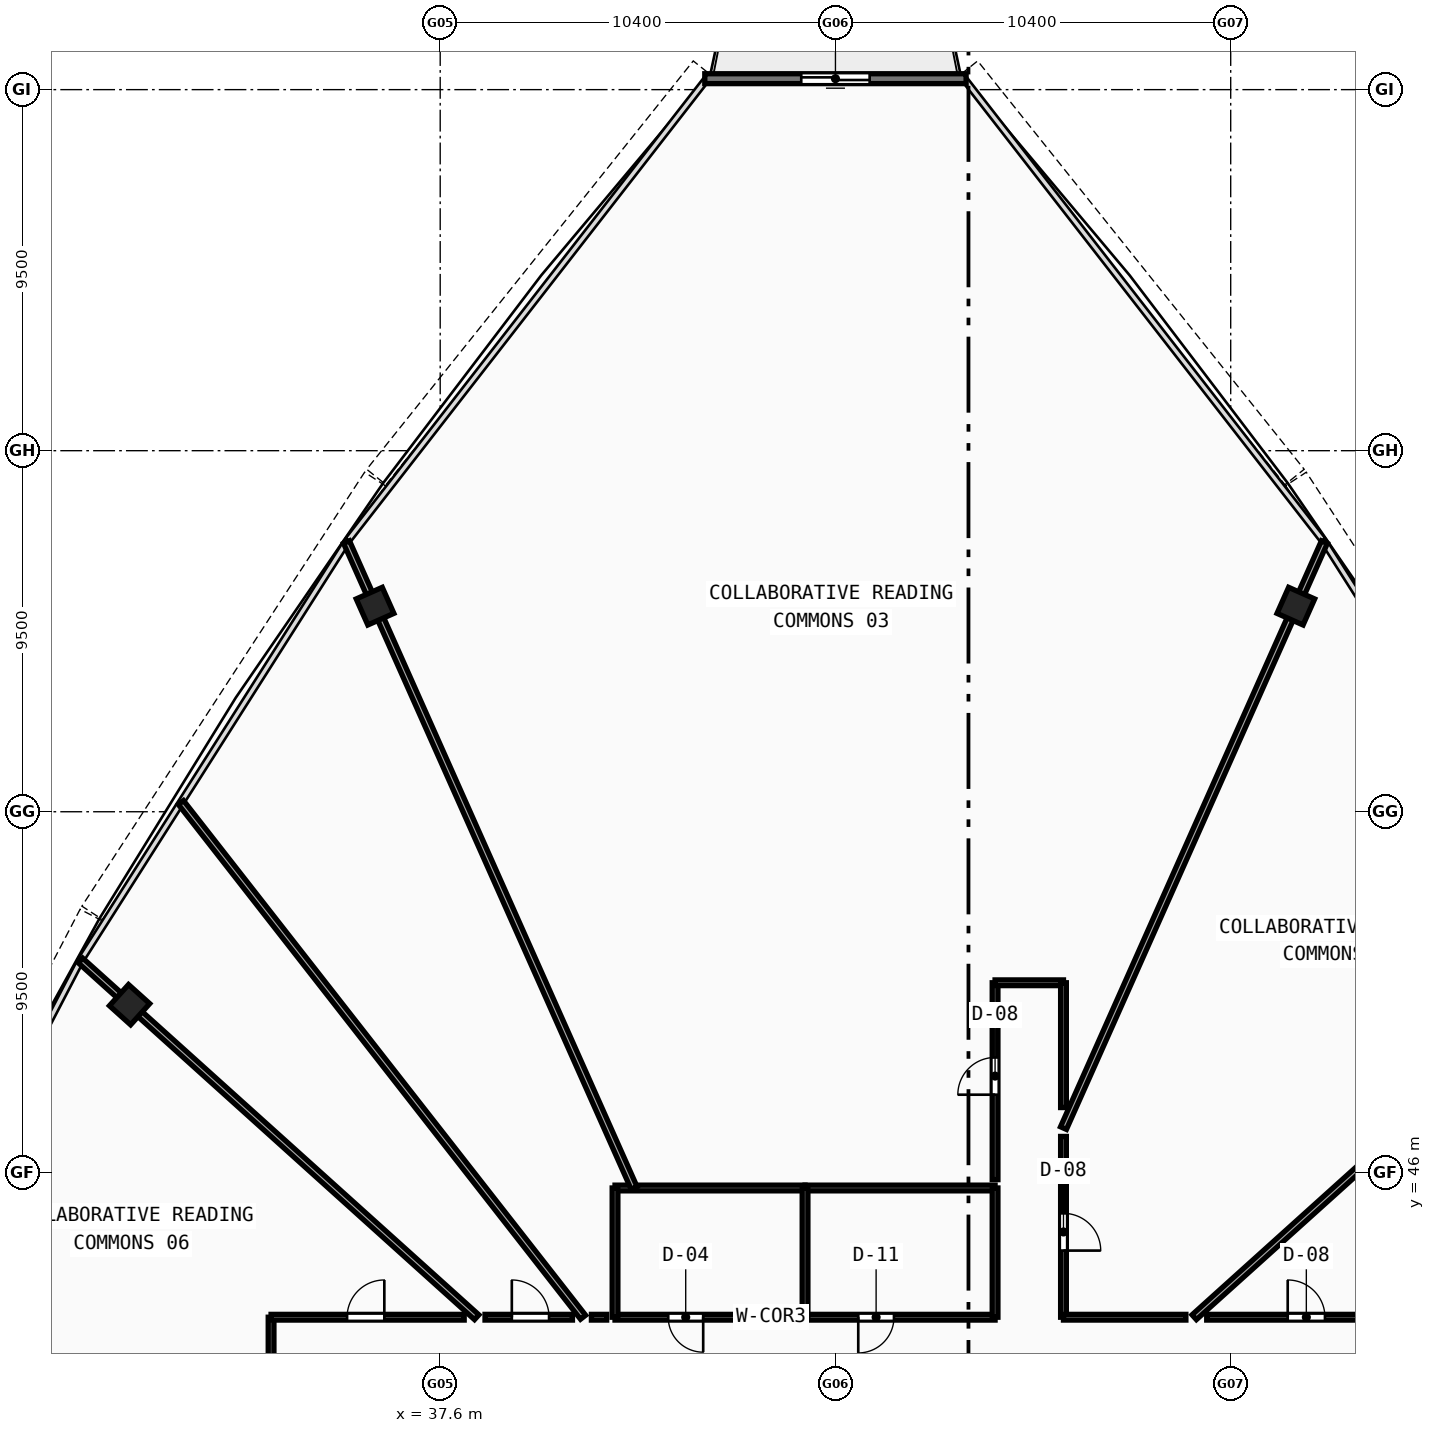
"""IFC4 building model, lengths in metres.
Left out: names, types, materials, properties, quantities, classifications, styles, units other than length and angle.
Written with IfcOpenShell. Run it as: python <this file> out.ifc"""

import sys

from ifc_helpers import new_model, si_unit, direction, frame, frame_2d, origin, origin_with_axes, origin_2d, place, context, subcontext, project, spatial, rectangle, hollow_rectangle, extrude, source, transform, mapped, element, fill, save


model = new_model("IFC4")
c1 = context("Model", 3, precision=1e-05, world=origin(), true_north=direction((0.0, 1.0)))
c2 = subcontext(c1, "Body", "Model", "MODEL_VIEW")
j1 = project(units=[si_unit("LENGTHUNIT", "METRE"), si_unit("PLANEANGLEUNIT", "RADIAN")], contexts=[c1])
p1 = place(None, origin())
s1 = spatial("IfcSite", under=j1, at=p1, CompositionType="ELEMENT")
p2 = place(p1, origin())
s2 = spatial("IfcBuilding", under=s1, at=p2, CompositionType="ELEMENT")
p3 = place(p2, frame((0.0, 0.0, 299.94)))
s3 = spatial("IfcBuildingStorey", under=s2, at=p3, CompositionType="ELEMENT", Elevation=299.94)
m1 = source(origin(), c2, "Body", "SweptSolid", [
    extrude(hollow_rectangle(XDim=0.75, YDim=0.75, WallThickness=0.028, at=origin_2d()), origin(), (0.0, 0.0, 1.0), 3.73),
])
for number, where, z_axis, x_axis in (
    (1, (60.114, 60.909, -0.26), (0.0, 0.0, 1.0), (-0.914, 0.407, 0.0)),
    (2, (35.886, 60.909, -0.26), (0.0, 0.0, 1.0), (-0.914, -0.407, 0.0)),
    (3, (29.427, 50.424, -0.26), (0.0, 0.0, 1.0), (-0.669, -0.743, 0.0)),
):
    element("IfcColumn", number, at=place(p3, frame(where, z_axis=z_axis, x_axis=x_axis)), inside=s3, PredefinedType="COLUMN", context=c2, shape_type="MappedRepresentation", body=[
        mapped(m1, transform((0.0, 0.0, 0.0), scale=1.0)),
    ])
p4 = place(p3, frame((51.438, 74.788, 0.0), z_axis=(0.0, 0.0, 1.0), x_axis=(-1.0, 0.0, 0.0)))
e4 = element("IfcWall", 4, at=p4, inside=s3, PredefinedType="STANDARD", context=c2, shape_type="SweptSolid", body=[
    extrude(rectangle(XDim=6.875, YDim=0.26, at=frame_2d((3.438, 0.0))), origin(), (0.0, 0.0, 1.0), 3.47),
])
p5 = place(p4, frame((2.538, 0.0, 0.0)))
e5 = element("IfcOpeningElement", 5, at=p5, cuts=e4, PredefinedType="OPENING", context=c2, shape_type="SweptSolid", body=[
    extrude(rectangle(XDim=1.8, YDim=2.15, at=frame_2d((0.9, 1.075))), frame((0.0, 0.14, 0.0), z_axis=(0.0, -1.0, 0.0), x_axis=(1.0, 0.0, 0.0)), (0.0, 0.0, 1.0), 0.28),
])
p6 = place(p3, frame((42.2, 42.2, 0.0), z_axis=(0.0, 0.0, 1.0), x_axis=(1.0, 0.0, 0.0)))
e6 = element("IfcWall", 6, at=p6, inside=s3, PredefinedType="PARTITIONING", context=c2, shape_type="SweptSolid", body=[
    extrude(rectangle(XDim=5.0, YDim=0.15, at=frame_2d((2.5, 0.0))), origin(), (0.0, 0.0, 1.0), 2.87),
])
p7 = place(p6, frame((1.4, 0.0, 0.0)))
e7 = element("IfcOpeningElement", 7, at=p7, cuts=e6, PredefinedType="OPENING", context=c2, shape_type="SweptSolid", body=[
    extrude(rectangle(XDim=0.92, YDim=2.1, at=frame_2d((0.46, 1.05))), frame((0.0, 0.085, 0.0), z_axis=(0.0, -1.0, 0.0), x_axis=(1.0, 0.0, 0.0)), (0.0, 0.0, 1.0), 0.17),
])
p8 = place(p3, frame((42.2, 45.6, 0.0), z_axis=(0.0, 0.0, 1.0), x_axis=(1.0, 0.0, 0.0)))
e8 = element("IfcWall", 8, at=p8, inside=s3, PredefinedType="PARTITIONING", context=c2, shape_type="SweptSolid", body=[
    extrude(rectangle(XDim=5.0, YDim=0.15, at=frame_2d((2.5, 0.0))), origin(), (0.0, 0.0, 1.0), 2.87),
])
p9 = place(p3, frame((42.2, 42.2, 0.0), z_axis=(0.0, 0.0, 1.0), x_axis=(0.0, 1.0, 0.0)))
e9 = element("IfcWall", 9, at=p9, inside=s3, PredefinedType="PARTITIONING", context=c2, shape_type="SweptSolid", body=[
    extrude(rectangle(XDim=3.4, YDim=0.15, at=frame_2d((1.7, 0.0))), origin(), (0.0, 0.0, 1.0), 3.47),
])
p10 = place(p3, frame((47.2, 42.2, 0.0), z_axis=(0.0, 0.0, 1.0), x_axis=(1.0, 0.0, 0.0)))
e10 = element("IfcWall", 10, at=p10, inside=s3, PredefinedType="PARTITIONING", context=c2, shape_type="SweptSolid", body=[
    extrude(rectangle(XDim=5.0, YDim=0.15, at=frame_2d((2.5, 0.0))), origin(), (0.0, 0.0, 1.0), 2.87),
])
p11 = place(p10, frame((1.4, 0.0, 0.0)))
e11 = element("IfcOpeningElement", 11, at=p11, cuts=e10, PredefinedType="OPENING", context=c2, shape_type="SweptSolid", body=[
    extrude(rectangle(XDim=0.94, YDim=2.1, at=frame_2d((0.47, 1.05))), frame((0.0, 0.085, 0.0), z_axis=(0.0, -1.0, 0.0), x_axis=(1.0, 0.0, 0.0)), (0.0, 0.0, 1.0), 0.17),
])
p12 = place(p3, frame((47.2, 45.6, 0.0), z_axis=(0.0, 0.0, 1.0), x_axis=(1.0, 0.0, 0.0)))
e12 = element("IfcWall", 12, at=p12, inside=s3, PredefinedType="PARTITIONING", context=c2, shape_type="SweptSolid", body=[
    extrude(rectangle(XDim=5.0, YDim=0.15, at=frame_2d((2.5, 0.0))), origin(), (0.0, 0.0, 1.0), 3.47),
])
p13 = place(p3, frame((47.2, 42.2, 0.0), z_axis=(0.0, 0.0, 1.0), x_axis=(0.0, 1.0, 0.0)))
e13 = element("IfcWall", 13, at=p13, inside=s3, PredefinedType="PARTITIONING", context=c2, shape_type="SweptSolid", body=[
    extrude(rectangle(XDim=3.4, YDim=0.15, at=frame_2d((1.7, 0.0))), origin(), (0.0, 0.0, 1.0), 3.47),
])
p14 = place(p3, frame((52.2, 42.2, 0.0), z_axis=(0.0, 0.0, 1.0), x_axis=(0.0, 1.0, 0.0)))
e14 = element("IfcWall", 14, at=p14, inside=s3, PredefinedType="PARTITIONING", context=c2, shape_type="SweptSolid", body=[
    extrude(rectangle(XDim=3.4, YDim=0.15, at=frame_2d((1.7, 0.0))), origin(), (0.0, 0.0, 1.0), 2.87),
])
p15 = place(p3, frame((57.44, 42.2, 0.0), z_axis=(0.0, 0.0, 1.0), x_axis=(0.74314439151, 0.669131088329, 0.0)))
e15 = element("IfcWall", 15, at=p15, inside=s3, PredefinedType="PARTITIONING", context=c2, shape_type="SweptSolid", body=[
    extrude(rectangle(XDim=14.026, YDim=0.17, at=frame_2d((7.013, 0.0))), origin(), (0.0, 0.0, 1.0), 2.87),
])
p16 = place(p3, frame((54.0, 47.176, 0.0), z_axis=(0.0, 0.0, 1.0), x_axis=(0.406741029061, 0.913543504863, 0.0)))
e16 = element("IfcWall", 16, at=p16, inside=s3, PredefinedType="PARTITIONING", context=c2, shape_type="SweptSolid", body=[
    extrude(rectangle(XDim=16.877, YDim=0.17, at=frame_2d((8.438, 0.0))), origin(), (0.0, 0.0, 1.0), 2.87),
])
p17 = place(p3, frame((42.702, 45.6, 0.0), z_axis=(0.0, 0.0, 1.0), x_axis=(-0.406747233578, 0.913540742374, 0.0)))
e17 = element("IfcWall", 17, at=p17, inside=s3, PredefinedType="PARTITIONING", context=c2, shape_type="SweptSolid", body=[
    extrude(rectangle(XDim=18.602, YDim=0.17, at=frame_2d((9.301, 0.0))), origin(), (0.0, 0.0, 1.0), 2.87),
])
p18 = place(p3, frame((41.359, 42.2, 0.0), z_axis=(0.0, 0.0, 1.0), x_axis=(-0.615656448173, 0.788014681223, 0.0)))
e18 = element("IfcWall", 18, at=p18, inside=s3, PredefinedType="PARTITIONING", context=c2, shape_type="SweptSolid", body=[
    extrude(rectangle(XDim=17.185, YDim=0.17, at=frame_2d((8.592, 0.0))), origin(), (0.0, 0.0, 1.0), 2.87),
])
p19 = place(p3, frame((38.56, 42.2, 0.0), z_axis=(0.0, 0.0, 1.0), x_axis=(-0.74314439151, 0.669131088329, 0.0)))
e19 = element("IfcWall", 19, at=p19, inside=s3, PredefinedType="PARTITIONING", context=c2, shape_type="SweptSolid", body=[
    extrude(rectangle(XDim=14.026, YDim=0.17, at=frame_2d((7.013, 0.0))), origin(), (0.0, 0.0, 1.0), 2.87),
])
p20 = place(p3, frame((33.15, 38.525, 0.0), z_axis=(0.0, 0.0, 1.0), x_axis=(-0.951060589798, 0.309004457141, 0.0)))
e20 = element("IfcWall", 20, at=p20, inside=s3, PredefinedType="PARTITIONING", context=c2, shape_type="SweptSolid", body=[
    extrude(rectangle(XDim=10.62, YDim=0.17, at=frame_2d((5.31, 0.0))), origin(), (0.0, 0.0, 1.0), 2.87),
])
p21 = place(p3, frame((33.15, 38.756, 0.0), z_axis=(0.0, 0.0, 1.0), x_axis=(0.0, 1.0, 0.0)))
e21 = element("IfcWall", 21, at=p21, inside=s3, PredefinedType="PARTITIONING", context=c2, shape_type="SweptSolid", body=[
    extrude(rectangle(XDim=3.444, YDim=0.15, at=frame_2d((1.722, 0.0))), origin(), (0.0, 0.0, 1.0), 3.12),
])
p22 = place(p3, frame((33.15, 42.2, 0.0), z_axis=(0.0, 0.0, 1.0), x_axis=(1.0, 0.0, 0.0)))
e22 = element("IfcWall", 22, at=p22, inside=s3, PredefinedType="PARTITIONING", context=c2, shape_type="SweptSolid", body=[
    extrude(rectangle(XDim=5.081, YDim=0.15, at=frame_2d((2.541, 0.0))), origin(), (0.0, 0.0, 1.0), 3.12),
])
p23 = place(p22, frame((2.0, 0.0, 0.0)))
e23 = element("IfcOpeningElement", 23, at=p23, cuts=e22, PredefinedType="OPENING", context=c2, shape_type="SweptSolid", body=[
    extrude(rectangle(XDim=0.98, YDim=2.12, at=frame_2d((0.49, 1.06))), frame((0.0, 0.085, 0.0), z_axis=(0.0, -1.0, 0.0), x_axis=(1.0, 0.0, 0.0)), (0.0, 0.0, 1.0), 0.17),
])
p24 = place(p3, frame((38.78, 42.2, 0.0), z_axis=(0.0, 0.0, 1.0), x_axis=(1.0, 0.0, 0.0)))
e24 = element("IfcWall", 24, at=p24, inside=s3, PredefinedType="PARTITIONING", context=c2, shape_type="SweptSolid", body=[
    extrude(rectangle(XDim=2.3, YDim=0.15, at=frame_2d((1.15, 0.0))), origin(), (0.0, 0.0, 1.0), 2.87),
])
p25 = place(p24, frame((0.705, 0.0, 0.0)))
e25 = element("IfcOpeningElement", 25, at=p25, cuts=e24, PredefinedType="OPENING", context=c2, shape_type="SweptSolid", body=[
    extrude(rectangle(XDim=0.98, YDim=2.12, at=frame_2d((0.49, 1.06))), frame((0.0, 0.085, 0.0), z_axis=(0.0, -1.0, 0.0), x_axis=(1.0, 0.0, 0.0)), (0.0, 0.0, 1.0), 0.17),
])
p26 = place(p3, frame((41.579, 42.2, 0.0), z_axis=(0.0, 0.0, 1.0), x_axis=(1.0, 0.0, 0.0)))
e26 = element("IfcWall", 26, at=p26, inside=s3, PredefinedType="PARTITIONING", context=c2, shape_type="SweptSolid", body=[
    extrude(rectangle(XDim=0.401, YDim=0.15, at=frame_2d((0.201, 0.0))), origin(), (0.0, 0.0, 1.0), 3.47),
])
p27 = place(p3, frame((52.2, 45.82, 0.0), z_axis=(0.0, 0.0, 1.0), x_axis=(0.0, 1.0, 0.0)))
e27 = element("IfcWall", 27, at=p27, inside=s3, PredefinedType="PARTITIONING", context=c2, shape_type="SweptSolid", body=[
    extrude(rectangle(XDim=5.18, YDim=0.15, at=frame_2d((2.59, 0.0))), origin(), (0.0, 0.0, 1.0), 3.12),
])
p28 = place(p27, frame((2.235, 0.0, 0.0)))
e28 = element("IfcOpeningElement", 28, at=p28, cuts=e27, PredefinedType="OPENING", context=c2, shape_type="SweptSolid", body=[
    extrude(rectangle(XDim=0.98, YDim=2.12, at=frame_2d((0.49, 1.06))), frame((0.0, 0.085, 0.0), z_axis=(0.0, -1.0, 0.0), x_axis=(1.0, 0.0, 0.0)), (0.0, 0.0, 1.0), 0.17),
])
p29 = place(p3, frame((52.2, 51.0, 0.0), z_axis=(0.0, 0.0, 1.0), x_axis=(1.0, 0.0, 0.0)))
e29 = element("IfcWall", 29, at=p29, inside=s3, PredefinedType="PARTITIONING", context=c2, shape_type="SweptSolid", body=[
    extrude(rectangle(XDim=1.8, YDim=0.15, at=frame_2d((0.9, 0.0))), origin(), (0.0, 0.0, 1.0), 3.47),
])
p30 = place(p3, frame((54.0, 51.0, 0.0), z_axis=(0.0, 0.0, 1.0), x_axis=(0.0, -1.0, 0.0)))
e30 = element("IfcWall", 30, at=p30, inside=s3, PredefinedType="PARTITIONING", context=c2, shape_type="SweptSolid", body=[
    extrude(rectangle(XDim=3.283, YDim=0.15, at=frame_2d((1.642, 0.0))), origin(), (0.0, 0.0, 1.0), 3.12),
])
p31 = place(p3, frame((54.0, 46.956, 0.0), z_axis=(0.0, 0.0, 1.0), x_axis=(0.0, -1.0, 0.0)))
e31 = element("IfcWall", 31, at=p31, inside=s3, PredefinedType="PARTITIONING", context=c2, shape_type="SweptSolid", body=[
    extrude(rectangle(XDim=4.756, YDim=0.15, at=frame_2d((2.378, 0.0))), origin(), (0.0, 0.0, 1.0), 2.87),
])
p32 = place(p31, frame((2.023, 0.0, 0.0)))
e32 = element("IfcOpeningElement", 32, at=p32, cuts=e31, PredefinedType="OPENING", context=c2, shape_type="SweptSolid", body=[
    extrude(rectangle(XDim=0.98, YDim=2.12, at=frame_2d((0.49, 1.06))), frame((0.0, 0.085, 0.0), z_axis=(0.0, -1.0, 0.0), x_axis=(1.0, 0.0, 0.0)), (0.0, 0.0, 1.0), 0.17),
])
p33 = place(p3, frame((54.0, 42.2, 0.0), z_axis=(0.0, 0.0, 1.0), x_axis=(1.0, 0.0, 0.0)))
e33 = element("IfcWall", 33, at=p33, inside=s3, PredefinedType="PARTITIONING", context=c2, shape_type="SweptSolid", body=[
    extrude(rectangle(XDim=3.22, YDim=0.15, at=frame_2d((1.61, 0.0))), origin(), (0.0, 0.0, 1.0), 2.87),
])
p34 = place(p3, frame((57.769, 42.2, 0.0), z_axis=(0.0, 0.0, 1.0), x_axis=(1.0, 0.0, 0.0)))
e34 = element("IfcWall", 34, at=p34, inside=s3, PredefinedType="PARTITIONING", context=c2, shape_type="SweptSolid", body=[
    extrude(rectangle(XDim=5.081, YDim=0.15, at=frame_2d((2.541, 0.0))), origin(), (0.0, 0.0, 1.0), 3.12),
])
p35 = place(p34, frame((2.131, 0.0, 0.0)))
e35 = element("IfcOpeningElement", 35, at=p35, cuts=e34, PredefinedType="OPENING", context=c2, shape_type="SweptSolid", body=[
    extrude(rectangle(XDim=0.98, YDim=2.12, at=frame_2d((0.49, 1.06))), frame((0.0, 0.085, 0.0), z_axis=(0.0, -1.0, 0.0), x_axis=(1.0, 0.0, 0.0)), (0.0, 0.0, 1.0), 0.17),
])
m2 = source(origin(), c2, "Body", "SweptSolid", [
    extrude(rectangle(XDim=1.8, YDim=2.15, at=frame_2d((0.9, 1.075))), frame((0.0, 0.025, 0.0), z_axis=(0.0, -1.0, 0.0), x_axis=(1.0, 0.0, 0.0)), (0.0, 0.0, 1.0), 0.05),
])
p36 = place(p5, origin_with_axes())
e36 = element("IfcDoor", 36, at=p36, inside=s3, OperationType="DOUBLE_DOOR_SLIDING", PredefinedType="DOOR", context=c2, shape_type="MappedRepresentation", body=[
    mapped(m2, transform((0.0, 0.0, 0.0), scale=1.0)),
])
fill(e5, e36)
m3 = source(origin(), c2, "Body", "SweptSolid", [
    extrude(rectangle(XDim=0.92, YDim=2.1, at=frame_2d((0.46, 1.05))), frame((0.0, 0.025, 0.0), z_axis=(0.0, -1.0, 0.0), x_axis=(1.0, 0.0, 0.0)), (0.0, 0.0, 1.0), 0.05),
])
p37 = place(p7, frame((0.92, 0.0, 0.0), z_axis=(0.0, 0.0, 1.0), x_axis=(-1.0, 0.0, 0.0)))
e37 = element("IfcDoor", 37, at=p37, inside=s3, OperationType="SINGLE_SWING_LEFT", PredefinedType="DOOR", context=c2, shape_type="MappedRepresentation", body=[
    mapped(m3, transform((0.0, 0.0, 0.0), scale=1.0)),
])
fill(e7, e37)
m4 = source(origin(), c2, "Body", "SweptSolid", [
    extrude(rectangle(XDim=0.94, YDim=2.1, at=frame_2d((0.47, 1.05))), frame((0.0, 0.025, 0.0), z_axis=(0.0, -1.0, 0.0), x_axis=(1.0, 0.0, 0.0)), (0.0, 0.0, 1.0), 0.05),
])
p38 = place(p11, frame((0.94, 0.0, 0.0), z_axis=(0.0, 0.0, 1.0), x_axis=(-1.0, 0.0, 0.0)))
e38 = element("IfcDoor", 38, at=p38, inside=s3, OperationType="SINGLE_SWING_RIGHT", PredefinedType="DOOR", context=c2, shape_type="MappedRepresentation", body=[
    mapped(m4, transform((0.0, 0.0, 0.0), scale=1.0)),
])
fill(e11, e38)
m5 = source(origin(), c2, "Body", "SweptSolid", [
    extrude(rectangle(XDim=0.98, YDim=2.12, at=frame_2d((0.49, 1.06))), frame((0.0, 0.025, 0.0), z_axis=(0.0, -1.0, 0.0), x_axis=(1.0, 0.0, 0.0)), (0.0, 0.0, 1.0), 0.05),
])
p39 = place(p35, origin_with_axes())
e39 = element("IfcDoor", 39, at=p39, inside=s3, OperationType="SINGLE_SWING_LEFT", PredefinedType="DOOR", context=c2, shape_type="MappedRepresentation", body=[
    mapped(m5, transform((0.0, 0.0, 0.0), scale=1.0)),
])
fill(e35, e39)
p40 = place(p32, origin_with_axes())
e40 = element("IfcDoor", 40, at=p40, inside=s3, OperationType="SINGLE_SWING_RIGHT", PredefinedType="DOOR", context=c2, shape_type="MappedRepresentation", body=[
    mapped(m5, transform((0.0, 0.0, 0.0), scale=1.0)),
])
fill(e32, e40)
p41 = place(p28, origin_with_axes())
e41 = element("IfcDoor", 41, at=p41, inside=s3, OperationType="SINGLE_SWING_LEFT", PredefinedType="DOOR", context=c2, shape_type="MappedRepresentation", body=[
    mapped(m5, transform((0.0, 0.0, 0.0), scale=1.0)),
])
fill(e28, e41)
p42 = place(p25, origin_with_axes())
e42 = element("IfcDoor", 42, at=p42, inside=s3, OperationType="SINGLE_SWING_LEFT", PredefinedType="DOOR", context=c2, shape_type="MappedRepresentation", body=[
    mapped(m5, transform((0.0, 0.0, 0.0), scale=1.0)),
])
fill(e25, e42)
p43 = place(p23, origin_with_axes())
e43 = element("IfcDoor", 43, at=p43, inside=s3, OperationType="SINGLE_SWING_RIGHT", PredefinedType="DOOR", context=c2, shape_type="MappedRepresentation", body=[
    mapped(m5, transform((0.0, 0.0, 0.0), scale=1.0)),
])
fill(e23, e43)
save(model, sys.argv[1])
